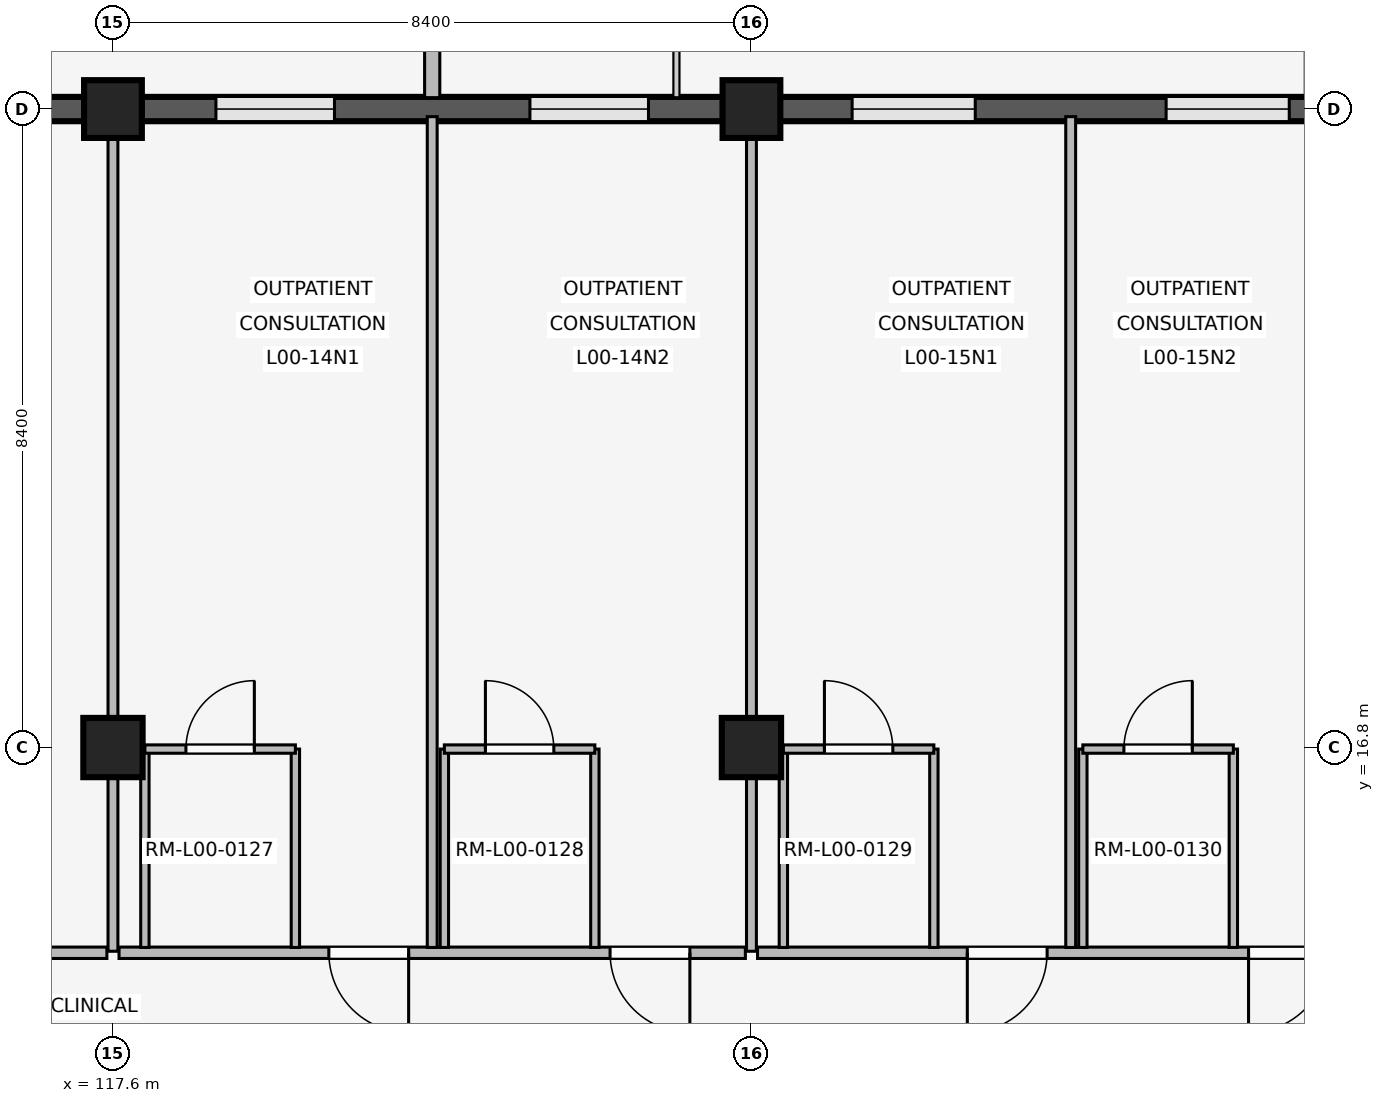
"""IFC4 building model, lengths in metres.
Left out: names, types, materials, properties, quantities, classifications, styles, units other than length and angle.
Written with IfcOpenShell. Run it as: python <this file> out.ifc"""

import sys

from ifc_helpers import new_model, si_unit, direction, frame, frame_2d, origin, origin_2d, place, context, subcontext, project, spatial, rectangle, extrude, element, fill, save


model = new_model("IFC4")
c1 = context("Model", 3, precision=1e-05, world=origin(), true_north=direction((0.0, 1.0)))
c2 = subcontext(c1, "Body", "Model", "MODEL_VIEW")
j1 = project(units=[si_unit("LENGTHUNIT", "METRE"), si_unit("PLANEANGLEUNIT", "RADIAN")], contexts=[c1])
p1 = place(None, origin())
s1 = spatial("IfcSite", under=j1, at=p1, CompositionType="ELEMENT")
p2 = place(p1, origin())
s2 = spatial("IfcBuilding", under=s1, at=p2, CompositionType="ELEMENT")
p3 = place(p2, origin())
s3 = spatial("IfcBuildingStorey", under=s2, at=p3, CompositionType="ELEMENT", Elevation=0.0)
p4 = place(p3, frame((117.6, 16.8, 0.0), z_axis=(0.0, 0.0, 1.0), x_axis=(1.0, 0.0, 0.0)))
e1 = element("IfcColumn", 1, at=p4, inside=s3, PredefinedType="COLUMN", context=c2, shape_type="SweptSolid", body=[
    extrude(rectangle(XDim=0.78, YDim=0.78, at=origin_2d()), origin(), (0.0, 0.0, 1.0), 4.8),
])
p5 = place(p3, frame((117.6, 25.2, 0.0), z_axis=(0.0, 0.0, 1.0), x_axis=(1.0, 0.0, 0.0)))
e2 = element("IfcColumn", 2, at=p5, inside=s3, PredefinedType="COLUMN", context=c2, shape_type="SweptSolid", body=[
    extrude(rectangle(XDim=0.76, YDim=0.76, at=origin_2d()), origin(), (0.0, 0.0, 1.0), 4.8),
])
p6 = place(p3, frame((126.0, 16.8, 0.0), z_axis=(0.0, 0.0, 1.0), x_axis=(1.0, 0.0, 0.0)))
e3 = element("IfcColumn", 3, at=p6, inside=s3, PredefinedType="COLUMN", context=c2, shape_type="SweptSolid", body=[
    extrude(rectangle(XDim=0.78, YDim=0.78, at=origin_2d()), origin(), (0.0, 0.0, 1.0), 4.8),
])
p7 = place(p3, frame((126.0, 25.2, 0.0), z_axis=(0.0, 0.0, 1.0), x_axis=(1.0, 0.0, 0.0)))
e4 = element("IfcColumn", 4, at=p7, inside=s3, PredefinedType="COLUMN", context=c2, shape_type="SweptSolid", body=[
    extrude(rectangle(XDim=0.76, YDim=0.76, at=origin_2d()), origin(), (0.0, 0.0, 1.0), 4.8),
])
p8 = place(p3, frame((109.575, 25.2, 0.0), z_axis=(0.0, 0.0, 1.0), x_axis=(1.0, 0.0, 0.0)))
e5 = element("IfcWall", 5, at=p8, inside=s3, PredefinedType="SOLIDWALL", context=c2, shape_type="SweptSolid", body=[
    extrude(rectangle(XDim=7.65, YDim=0.32, at=frame_2d((3.825, 0.0))), origin(), (0.0, 0.0, 1.0), 3.82),
])
p9 = place(p8, frame((1.07, 0.0, 0.85)))
e6 = element("IfcOpeningElement", 6, at=p9, cuts=e5, PredefinedType="OPENING", context=c2, shape_type="SweptSolid", body=[
    extrude(rectangle(XDim=1.38, YDim=1.5, at=frame_2d((0.69, 0.75))), frame((0.0, 0.17, 0.0), z_axis=(0.0, -1.0, 0.0), x_axis=(1.0, 0.0, 0.0)), (0.0, 0.0, 1.0), 0.34),
])
p10 = place(p8, frame((5.2, 0.0, 0.85)))
e7 = element("IfcOpeningElement", 7, at=p10, cuts=e5, PredefinedType="OPENING", context=c2, shape_type="SweptSolid", body=[
    extrude(rectangle(XDim=1.38, YDim=1.5, at=frame_2d((0.69, 0.75))), frame((0.0, 0.17, 0.0), z_axis=(0.0, -1.0, 0.0), x_axis=(1.0, 0.0, 0.0)), (0.0, 0.0, 1.0), 0.34),
])
p11 = place(p3, frame((117.975, 25.2, 0.0), z_axis=(0.0, 0.0, 1.0), x_axis=(1.0, 0.0, 0.0)))
e8 = element("IfcWall", 8, at=p11, inside=s3, PredefinedType="SOLIDWALL", context=c2, shape_type="SweptSolid", body=[
    extrude(rectangle(XDim=7.65, YDim=0.32, at=frame_2d((3.825, 0.0))), origin(), (0.0, 0.0, 1.0), 3.82),
])
p12 = place(p11, frame((0.979, 0.0, 0.85)))
e9 = element("IfcOpeningElement", 9, at=p12, cuts=e8, PredefinedType="OPENING", context=c2, shape_type="SweptSolid", body=[
    extrude(rectangle(XDim=1.56, YDim=1.7, at=frame_2d((0.78, 0.85))), frame((0.0, 0.17, 0.0), z_axis=(0.0, -1.0, 0.0), x_axis=(1.0, 0.0, 0.0)), (0.0, 0.0, 1.0), 0.34),
])
p13 = place(p11, frame((5.111, 0.0, 0.85)))
e10 = element("IfcOpeningElement", 10, at=p13, cuts=e8, PredefinedType="OPENING", context=c2, shape_type="SweptSolid", body=[
    extrude(rectangle(XDim=1.56, YDim=1.7, at=frame_2d((0.78, 0.85))), frame((0.0, 0.17, 0.0), z_axis=(0.0, -1.0, 0.0), x_axis=(1.0, 0.0, 0.0)), (0.0, 0.0, 1.0), 0.34),
])
p14 = place(p3, frame((121.8, 25.35, 0.0), z_axis=(0.0, 0.0, 1.0), x_axis=(0.0, 1.0, 0.0)))
e11 = element("IfcWall", 11, at=p14, inside=s3, PredefinedType="ELEMENTEDWALL", context=c2, shape_type="SweptSolid", body=[
    extrude(rectangle(XDim=0.85, YDim=0.2, at=frame_2d((0.425, 0.0))), origin(), (0.0, 0.0, 1.0), 3.8),
])
p15 = place(p3, frame((126.375, 25.2, 0.0), z_axis=(0.0, 0.0, 1.0), x_axis=(1.0, 0.0, 0.0)))
e12 = element("IfcWall", 12, at=p15, inside=s3, PredefinedType="SOLIDWALL", context=c2, shape_type="SweptSolid", body=[
    extrude(rectangle(XDim=7.65, YDim=0.32, at=frame_2d((3.825, 0.0))), origin(), (0.0, 0.0, 1.0), 3.82),
])
p16 = place(p15, frame((0.949, 0.0, 0.85)))
e13 = element("IfcOpeningElement", 13, at=p16, cuts=e12, PredefinedType="OPENING", context=c2, shape_type="SweptSolid", body=[
    extrude(rectangle(XDim=1.62, YDim=1.8, at=frame_2d((0.81, 0.9))), frame((0.0, 0.17, 0.0), z_axis=(0.0, -1.0, 0.0), x_axis=(1.0, 0.0, 0.0)), (0.0, 0.0, 1.0), 0.34),
])
p17 = place(p15, frame((5.081, 0.0, 0.85)))
e14 = element("IfcOpeningElement", 14, at=p17, cuts=e12, PredefinedType="OPENING", context=c2, shape_type="SweptSolid", body=[
    extrude(rectangle(XDim=1.62, YDim=1.8, at=frame_2d((0.81, 0.9))), frame((0.0, 0.17, 0.0), z_axis=(0.0, -1.0, 0.0), x_axis=(1.0, 0.0, 0.0)), (0.0, 0.0, 1.0), 0.34),
])
p18 = place(p3, frame((117.52, 14.1, 0.0), z_axis=(0.0, 0.0, 1.0), x_axis=(-1.0, 0.0, 0.0)))
e15 = element("IfcWall", 15, at=p18, inside=s3, PredefinedType="PARTITIONING", context=c2, shape_type="SweptSolid", body=[
    extrude(rectangle(XDim=8.24, YDim=0.15, at=frame_2d((4.12, 0.0))), origin(), (0.0, 0.0, 1.0), 3.8),
])
p19 = place(p18, frame((3.545, 0.0, 0.0)))
e16 = element("IfcOpeningElement", 16, at=p19, cuts=e15, PredefinedType="OPENING", context=c2, shape_type="SweptSolid", body=[
    extrude(rectangle(XDim=1.15, YDim=2.2, at=frame_2d((0.575, 1.1))), frame((0.0, 0.085, 0.0), z_axis=(0.0, -1.0, 0.0), x_axis=(1.0, 0.0, 0.0)), (0.0, 0.0, 1.0), 0.17),
])
p20 = place(p3, frame((117.6, 14.12, 0.0), z_axis=(0.0, 0.0, 1.0), x_axis=(0.0, 1.0, 0.0)))
e17 = element("IfcWall", 17, at=p20, inside=s3, PredefinedType="PARTITIONING", context=c2, shape_type="SweptSolid", body=[
    extrude(rectangle(XDim=10.94, YDim=0.13, at=frame_2d((5.47, 0.0))), origin(), (0.0, 0.0, 1.0), 3.8),
])
p21 = place(p3, frame((125.92, 14.1, 0.0), z_axis=(0.0, 0.0, 1.0), x_axis=(-1.0, 0.0, 0.0)))
e18 = element("IfcWall", 18, at=p21, inside=s3, PredefinedType="PARTITIONING", context=c2, shape_type="SweptSolid", body=[
    extrude(rectangle(XDim=8.24, YDim=0.15, at=frame_2d((4.12, 0.0))), origin(), (0.0, 0.0, 1.0), 3.8),
])
p22 = place(p21, frame((0.73, 0.0, 0.0)))
e19 = element("IfcOpeningElement", 19, at=p22, cuts=e18, PredefinedType="OPENING", context=c2, shape_type="SweptSolid", body=[
    extrude(rectangle(XDim=1.05, YDim=2.2, at=frame_2d((0.525, 1.1))), frame((0.0, 0.085, 0.0), z_axis=(0.0, -1.0, 0.0), x_axis=(1.0, 0.0, 0.0)), (0.0, 0.0, 1.0), 0.17),
])
p23 = place(p21, frame((4.43, 0.0, 0.0)))
e20 = element("IfcOpeningElement", 20, at=p23, cuts=e18, PredefinedType="OPENING", context=c2, shape_type="SweptSolid", body=[
    extrude(rectangle(XDim=1.05, YDim=2.2, at=frame_2d((0.525, 1.1))), frame((0.0, 0.085, 0.0), z_axis=(0.0, -1.0, 0.0), x_axis=(1.0, 0.0, 0.0)), (0.0, 0.0, 1.0), 0.17),
])
p24 = place(p3, frame((121.8, 14.17, 0.0), z_axis=(0.0, 0.0, 1.0), x_axis=(0.0, 1.0, 0.0)))
e21 = element("IfcWall", 21, at=p24, inside=s3, PredefinedType="PARTITIONING", context=c2, shape_type="SweptSolid", body=[
    extrude(rectangle(XDim=10.93, YDim=0.13, at=frame_2d((5.465, 0.0))), origin(), (0.0, 0.0, 1.0), 3.8),
])
for number, where, z_axis, x_axis in (
    (22, (118.02, 14.17, 0.0), (0.0, 0.0, 1.0), (0.0, 1.0, 0.0)),
    (23, (120.0, 14.17, 0.0), (0.0, 0.0, 1.0), (0.0, 1.0, 0.0)),
):
    element("IfcWall", number, at=place(p3, frame(where, z_axis=z_axis, x_axis=x_axis)), inside=s3, PredefinedType="PARTITIONING", context=c2, shape_type="SweptSolid", body=[
        extrude(rectangle(XDim=2.61, YDim=0.11, at=frame_2d((1.305, 0.0))), origin(), (0.0, 0.0, 1.0), 3.8),
    ])
p25 = place(p3, frame((118.02, 16.78, 0.0), z_axis=(0.0, 0.0, 1.0), x_axis=(1.0, 0.0, 0.0)))
e24 = element("IfcWall", 24, at=p25, inside=s3, PredefinedType="PARTITIONING", context=c2, shape_type="SweptSolid", body=[
    extrude(rectangle(XDim=1.98, YDim=0.11, at=frame_2d((0.99, 0.0))), origin(), (0.0, 0.0, 1.0), 3.8),
])
p26 = place(p25, frame((0.54, 0.0, 0.0)))
e25 = element("IfcOpeningElement", 25, at=p26, cuts=e24, PredefinedType="OPENING", context=c2, shape_type="SweptSolid", body=[
    extrude(rectangle(XDim=0.9, YDim=2.1, at=frame_2d((0.45, 1.05))), frame((0.0, 0.065, 0.0), z_axis=(0.0, -1.0, 0.0), x_axis=(1.0, 0.0, 0.0)), (0.0, 0.0, 1.0), 0.13),
])
for number, where, z_axis, x_axis in (
    (26, (121.96, 14.17, 0.0), (0.0, 0.0, 1.0), (0.0, 1.0, 0.0)),
    (27, (123.94, 14.17, 0.0), (0.0, 0.0, 1.0), (0.0, 1.0, 0.0)),
):
    element("IfcWall", number, at=place(p3, frame(where, z_axis=z_axis, x_axis=x_axis)), inside=s3, PredefinedType="PARTITIONING", context=c2, shape_type="SweptSolid", body=[
        extrude(rectangle(XDim=2.61, YDim=0.11, at=frame_2d((1.305, 0.0))), origin(), (0.0, 0.0, 1.0), 3.8),
    ])
p27 = place(p3, frame((121.96, 16.78, 0.0), z_axis=(0.0, 0.0, 1.0), x_axis=(1.0, 0.0, 0.0)))
e28 = element("IfcWall", 28, at=p27, inside=s3, PredefinedType="PARTITIONING", context=c2, shape_type="SweptSolid", body=[
    extrude(rectangle(XDim=1.98, YDim=0.11, at=frame_2d((0.99, 0.0))), origin(), (0.0, 0.0, 1.0), 3.8),
])
p28 = place(p27, frame((0.54, 0.0, 0.0)))
e29 = element("IfcOpeningElement", 29, at=p28, cuts=e28, PredefinedType="OPENING", context=c2, shape_type="SweptSolid", body=[
    extrude(rectangle(XDim=0.9, YDim=2.1, at=frame_2d((0.45, 1.05))), frame((0.0, 0.065, 0.0), z_axis=(0.0, -1.0, 0.0), x_axis=(1.0, 0.0, 0.0)), (0.0, 0.0, 1.0), 0.13),
])
p29 = place(p3, frame((126.0, 14.12, 0.0), z_axis=(0.0, 0.0, 1.0), x_axis=(0.0, 1.0, 0.0)))
e30 = element("IfcWall", 30, at=p29, inside=s3, PredefinedType="PARTITIONING", context=c2, shape_type="SweptSolid", body=[
    extrude(rectangle(XDim=10.94, YDim=0.13, at=frame_2d((5.47, 0.0))), origin(), (0.0, 0.0, 1.0), 3.8),
])
p30 = place(p3, frame((134.26, 14.1, 0.0), z_axis=(0.0, 0.0, 1.0), x_axis=(-1.0, 0.0, 0.0)))
e31 = element("IfcWall", 31, at=p30, inside=s3, PredefinedType="PARTITIONING", context=c2, shape_type="SweptSolid", body=[
    extrude(rectangle(XDim=8.18, YDim=0.15, at=frame_2d((4.09, 0.0))), origin(), (0.0, 0.0, 1.0), 3.8),
])
p31 = place(p30, frame((0.67, 0.0, 0.0)))
e32 = element("IfcOpeningElement", 32, at=p31, cuts=e31, PredefinedType="OPENING", context=c2, shape_type="SweptSolid", body=[
    extrude(rectangle(XDim=1.05, YDim=2.2, at=frame_2d((0.525, 1.1))), frame((0.0, 0.085, 0.0), z_axis=(0.0, -1.0, 0.0), x_axis=(1.0, 0.0, 0.0)), (0.0, 0.0, 1.0), 0.17),
])
p32 = place(p30, frame((4.37, 0.0, 0.0)))
e33 = element("IfcOpeningElement", 33, at=p32, cuts=e31, PredefinedType="OPENING", context=c2, shape_type="SweptSolid", body=[
    extrude(rectangle(XDim=1.05, YDim=2.2, at=frame_2d((0.525, 1.1))), frame((0.0, 0.085, 0.0), z_axis=(0.0, -1.0, 0.0), x_axis=(1.0, 0.0, 0.0)), (0.0, 0.0, 1.0), 0.17),
])
p33 = place(p3, frame((130.2, 14.17, 0.0), z_axis=(0.0, 0.0, 1.0), x_axis=(0.0, 1.0, 0.0)))
e34 = element("IfcWall", 34, at=p33, inside=s3, PredefinedType="PARTITIONING", context=c2, shape_type="SweptSolid", body=[
    extrude(rectangle(XDim=10.93, YDim=0.13, at=frame_2d((5.465, 0.0))), origin(), (0.0, 0.0, 1.0), 3.8),
])
for number, where, z_axis, x_axis in (
    (35, (126.42, 14.17, 0.0), (0.0, 0.0, 1.0), (0.0, 1.0, 0.0)),
    (36, (128.4, 14.17, 0.0), (0.0, 0.0, 1.0), (0.0, 1.0, 0.0)),
):
    element("IfcWall", number, at=place(p3, frame(where, z_axis=z_axis, x_axis=x_axis)), inside=s3, PredefinedType="PARTITIONING", context=c2, shape_type="SweptSolid", body=[
        extrude(rectangle(XDim=2.61, YDim=0.11, at=frame_2d((1.305, 0.0))), origin(), (0.0, 0.0, 1.0), 3.8),
    ])
p34 = place(p3, frame((126.42, 16.78, 0.0), z_axis=(0.0, 0.0, 1.0), x_axis=(1.0, 0.0, 0.0)))
e37 = element("IfcWall", 37, at=p34, inside=s3, PredefinedType="PARTITIONING", context=c2, shape_type="SweptSolid", body=[
    extrude(rectangle(XDim=1.98, YDim=0.11, at=frame_2d((0.99, 0.0))), origin(), (0.0, 0.0, 1.0), 3.8),
])
p35 = place(p34, frame((0.54, 0.0, 0.0)))
e38 = element("IfcOpeningElement", 38, at=p35, cuts=e37, PredefinedType="OPENING", context=c2, shape_type="SweptSolid", body=[
    extrude(rectangle(XDim=0.9, YDim=2.1, at=frame_2d((0.45, 1.05))), frame((0.0, 0.065, 0.0), z_axis=(0.0, -1.0, 0.0), x_axis=(1.0, 0.0, 0.0)), (0.0, 0.0, 1.0), 0.13),
])
for number, where, z_axis, x_axis in (
    (39, (130.36, 14.17, 0.0), (0.0, 0.0, 1.0), (0.0, 1.0, 0.0)),
    (40, (132.34, 14.17, 0.0), (0.0, 0.0, 1.0), (0.0, 1.0, 0.0)),
):
    element("IfcWall", number, at=place(p3, frame(where, z_axis=z_axis, x_axis=x_axis)), inside=s3, PredefinedType="PARTITIONING", context=c2, shape_type="SweptSolid", body=[
        extrude(rectangle(XDim=2.61, YDim=0.11, at=frame_2d((1.305, 0.0))), origin(), (0.0, 0.0, 1.0), 3.8),
    ])
p36 = place(p3, frame((130.36, 16.78, 0.0), z_axis=(0.0, 0.0, 1.0), x_axis=(1.0, 0.0, 0.0)))
e41 = element("IfcWall", 41, at=p36, inside=s3, PredefinedType="PARTITIONING", context=c2, shape_type="SweptSolid", body=[
    extrude(rectangle(XDim=1.98, YDim=0.11, at=frame_2d((0.99, 0.0))), origin(), (0.0, 0.0, 1.0), 3.8),
])
p37 = place(p36, frame((0.54, 0.0, 0.0)))
e42 = element("IfcOpeningElement", 42, at=p37, cuts=e41, PredefinedType="OPENING", context=c2, shape_type="SweptSolid", body=[
    extrude(rectangle(XDim=0.9, YDim=2.1, at=frame_2d((0.45, 1.05))), frame((0.0, 0.065, 0.0), z_axis=(0.0, -1.0, 0.0), x_axis=(1.0, 0.0, 0.0)), (0.0, 0.0, 1.0), 0.13),
])
p38 = place(p12, origin())
e43 = element("IfcWindow", 43, at=p38, inside=s3, PartitioningType="SINGLE_PANEL", PredefinedType="WINDOW", context=c2, shape_type="SweptSolid", body=[
    extrude(rectangle(XDim=1.56, YDim=1.7, at=frame_2d((0.78, 0.85))), frame((0.0, 0.03, 0.0), z_axis=(0.0, -1.0, 0.0), x_axis=(1.0, 0.0, 0.0)), (0.0, 0.0, 1.0), 0.06),
])
fill(e9, e43)
p39 = place(p13, origin())
e44 = element("IfcWindow", 44, at=p39, inside=s3, PartitioningType="SINGLE_PANEL", PredefinedType="WINDOW", context=c2, shape_type="SweptSolid", body=[
    extrude(rectangle(XDim=1.56, YDim=1.7, at=frame_2d((0.78, 0.85))), frame((0.0, 0.03, 0.0), z_axis=(0.0, -1.0, 0.0), x_axis=(1.0, 0.0, 0.0)), (0.0, 0.0, 1.0), 0.06),
])
fill(e10, e44)
p40 = place(p16, origin())
e45 = element("IfcWindow", 45, at=p40, inside=s3, PartitioningType="SINGLE_PANEL", PredefinedType="WINDOW", context=c2, shape_type="SweptSolid", body=[
    extrude(rectangle(XDim=1.62, YDim=1.8, at=frame_2d((0.81, 0.9))), frame((0.0, 0.03, 0.0), z_axis=(0.0, -1.0, 0.0), x_axis=(1.0, 0.0, 0.0)), (0.0, 0.0, 1.0), 0.06),
])
fill(e13, e45)
p41 = place(p17, origin())
e46 = element("IfcWindow", 46, at=p41, inside=s3, PartitioningType="SINGLE_PANEL", PredefinedType="WINDOW", context=c2, shape_type="SweptSolid", body=[
    extrude(rectangle(XDim=1.62, YDim=1.8, at=frame_2d((0.81, 0.9))), frame((0.0, 0.03, 0.0), z_axis=(0.0, -1.0, 0.0), x_axis=(1.0, 0.0, 0.0)), (0.0, 0.0, 1.0), 0.06),
])
fill(e14, e46)
p42 = place(p22, origin())
e47 = element("IfcDoor", 47, at=p42, inside=s3, OperationType="SINGLE_SWING_LEFT", PredefinedType="DOOR", context=c2, shape_type="SweptSolid", body=[
    extrude(rectangle(XDim=1.05, YDim=2.2, at=frame_2d((0.525, 1.1))), frame((0.0, 0.025, 0.0), z_axis=(0.0, -1.0, 0.0), x_axis=(1.0, 0.0, 0.0)), (0.0, 0.0, 1.0), 0.05),
])
fill(e19, e47)
p43 = place(p23, origin())
e48 = element("IfcDoor", 48, at=p43, inside=s3, OperationType="SINGLE_SWING_LEFT", PredefinedType="DOOR", context=c2, shape_type="SweptSolid", body=[
    extrude(rectangle(XDim=1.05, YDim=2.2, at=frame_2d((0.525, 1.1))), frame((0.0, 0.025, 0.0), z_axis=(0.0, -1.0, 0.0), x_axis=(1.0, 0.0, 0.0)), (0.0, 0.0, 1.0), 0.05),
])
fill(e20, e48)
p44 = place(p26, origin())
e49 = element("IfcDoor", 49, at=p44, inside=s3, OperationType="SINGLE_SWING_RIGHT", PredefinedType="DOOR", context=c2, shape_type="SweptSolid", body=[
    extrude(rectangle(XDim=0.9, YDim=2.1, at=frame_2d((0.45, 1.05))), frame((0.0, 0.025, 0.0), z_axis=(0.0, -1.0, 0.0), x_axis=(1.0, 0.0, 0.0)), (0.0, 0.0, 1.0), 0.05),
])
fill(e25, e49)
p45 = place(p28, origin())
e50 = element("IfcDoor", 50, at=p45, inside=s3, OperationType="SINGLE_SWING_LEFT", PredefinedType="DOOR", context=c2, shape_type="SweptSolid", body=[
    extrude(rectangle(XDim=0.9, YDim=2.1, at=frame_2d((0.45, 1.05))), frame((0.0, 0.025, 0.0), z_axis=(0.0, -1.0, 0.0), x_axis=(1.0, 0.0, 0.0)), (0.0, 0.0, 1.0), 0.05),
])
fill(e29, e50)
p46 = place(p31, origin())
e51 = element("IfcDoor", 51, at=p46, inside=s3, OperationType="SINGLE_SWING_RIGHT", PredefinedType="DOOR", context=c2, shape_type="SweptSolid", body=[
    extrude(rectangle(XDim=1.05, YDim=2.2, at=frame_2d((0.525, 1.1))), frame((0.0, 0.025, 0.0), z_axis=(0.0, -1.0, 0.0), x_axis=(1.0, 0.0, 0.0)), (0.0, 0.0, 1.0), 0.05),
])
fill(e32, e51)
p47 = place(p32, origin())
e52 = element("IfcDoor", 52, at=p47, inside=s3, OperationType="SINGLE_SWING_RIGHT", PredefinedType="DOOR", context=c2, shape_type="SweptSolid", body=[
    extrude(rectangle(XDim=1.05, YDim=2.2, at=frame_2d((0.525, 1.1))), frame((0.0, 0.025, 0.0), z_axis=(0.0, -1.0, 0.0), x_axis=(1.0, 0.0, 0.0)), (0.0, 0.0, 1.0), 0.05),
])
fill(e33, e52)
p48 = place(p35, origin())
e53 = element("IfcDoor", 53, at=p48, inside=s3, OperationType="SINGLE_SWING_LEFT", PredefinedType="DOOR", context=c2, shape_type="SweptSolid", body=[
    extrude(rectangle(XDim=0.9, YDim=2.1, at=frame_2d((0.45, 1.05))), frame((0.0, 0.025, 0.0), z_axis=(0.0, -1.0, 0.0), x_axis=(1.0, 0.0, 0.0)), (0.0, 0.0, 1.0), 0.05),
])
fill(e38, e53)
p49 = place(p37, origin())
e54 = element("IfcDoor", 54, at=p49, inside=s3, OperationType="SINGLE_SWING_RIGHT", PredefinedType="DOOR", context=c2, shape_type="SweptSolid", body=[
    extrude(rectangle(XDim=0.9, YDim=2.1, at=frame_2d((0.45, 1.05))), frame((0.0, 0.025, 0.0), z_axis=(0.0, -1.0, 0.0), x_axis=(1.0, 0.0, 0.0)), (0.0, 0.0, 1.0), 0.05),
])
fill(e42, e54)
save(model, sys.argv[1])
